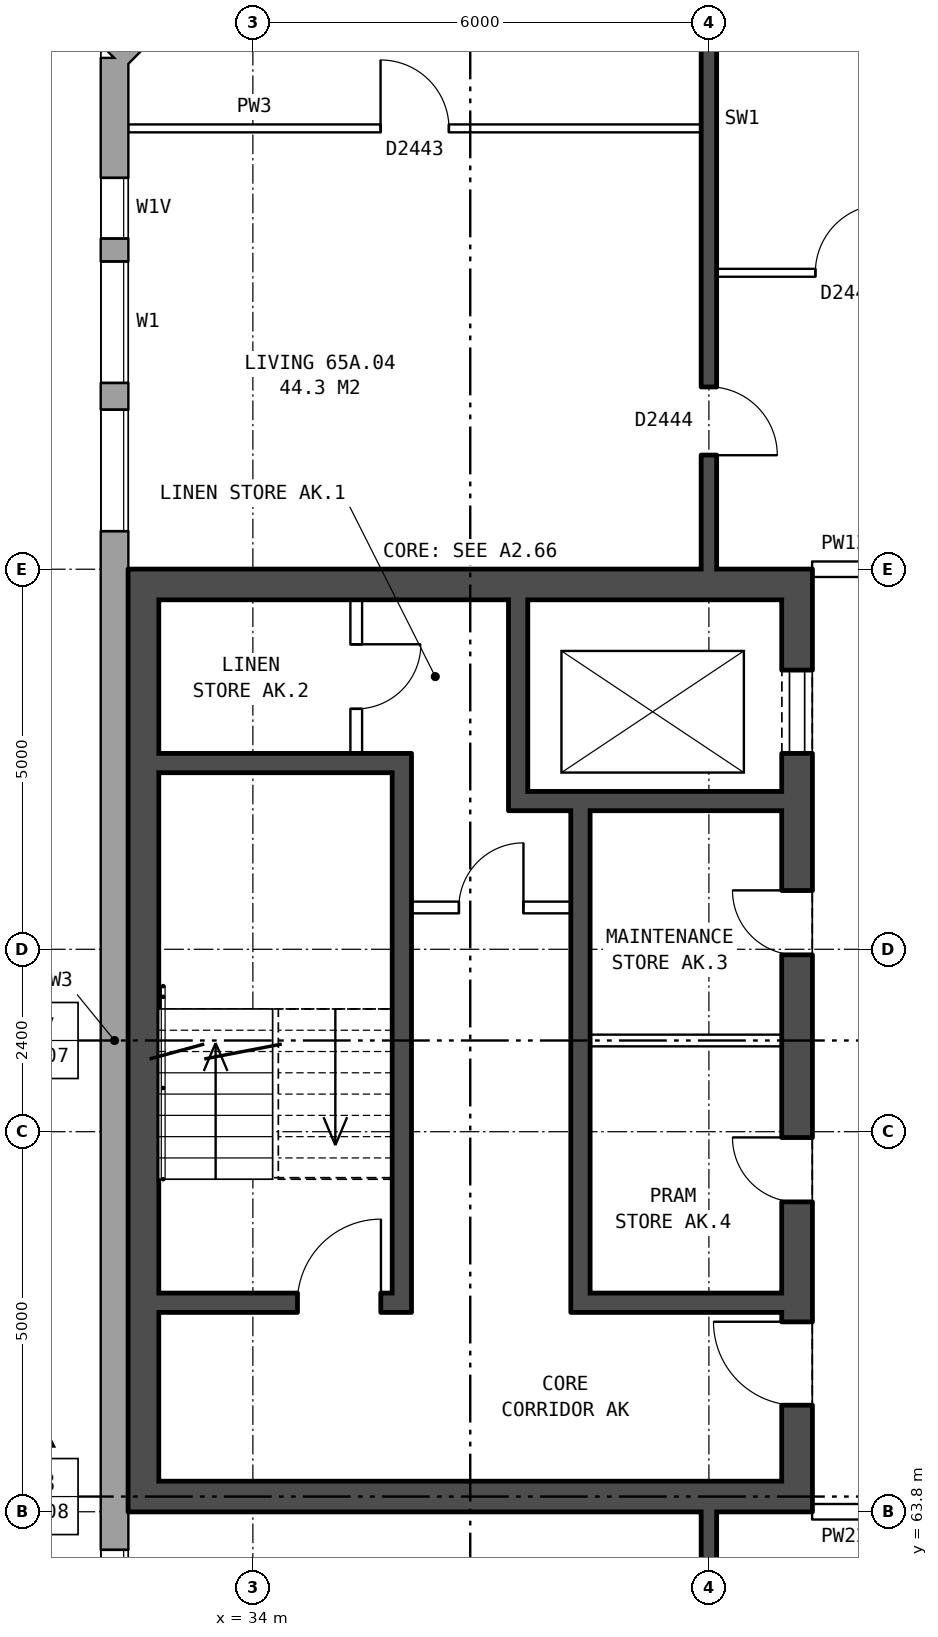
"""IFC4 building model, lengths in metres.
Left out: names, types, materials, properties, quantities, classifications, styles, units other than length and angle.
Written with IfcOpenShell. Run it as: python <this file> out.ifc"""

import sys

from ifc_helpers import new_model, si_unit, direction, frame, frame_2d, origin, place, context, subcontext, project, spatial, rectangle, extrude, element, fill, save


model = new_model("IFC4")
c1 = context("Model", 3, precision=1e-05, world=origin(), true_north=direction((0.0, 1.0)))
c2 = subcontext(c1, "Body", "Model", "MODEL_VIEW")
j1 = project(units=[si_unit("LENGTHUNIT", "METRE"), si_unit("PLANEANGLEUNIT", "RADIAN")], contexts=[c1])
p1 = place(None, origin())
s1 = spatial("IfcSite", under=j1, at=p1, CompositionType="ELEMENT")
p2 = place(p1, origin())
s2 = spatial("IfcBuilding", under=s1, at=p2, CompositionType="ELEMENT")
p3 = place(p2, frame((0.0, 0.0, 230.7)))
s3 = spatial("IfcBuildingStorey", under=s2, at=p3, CompositionType="ELEMENT", Elevation=230.7)
p4 = place(p3, frame((35.075, 85.82, 0.0), z_axis=(0.0, 0.0, 1.0), x_axis=(-0.707106781187, -0.707106781187, 0.0)))
e1 = element("IfcWall", 1, at=p4, inside=s3, PredefinedType="STANDARD", context=c2, shape_type="SweptSolid", body=[
    extrude(rectangle(XDim=4.094, YDim=0.36, at=frame_2d((2.047, 0.0))), origin(), (0.0, 0.0, 1.0), 2.85),
])
p5 = place(p4, frame((1.247, 0.0, 0.8)))
e2 = element("IfcOpeningElement", 2, at=p5, cuts=e1, PredefinedType="OPENING", context=c2, shape_type="SweptSolid", body=[
    extrude(rectangle(XDim=1.6, YDim=1.8, at=frame_2d((0.8, 0.9))), frame((0.0, 0.19, 0.0), z_axis=(0.0, -1.0, 0.0), x_axis=(1.0, 0.0, 0.0)), (0.0, 0.0, 1.0), 0.38),
])
p6 = place(p3, frame((32.18, 82.925, 0.0), z_axis=(0.0, 0.0, 1.0), x_axis=(0.0, -1.0, 0.0)))
e3 = element("IfcWall", 3, at=p6, inside=s3, PredefinedType="STANDARD", context=c2, shape_type="SweptSolid", body=[
    extrude(rectangle(XDim=25.851, YDim=0.36, at=frame_2d((12.925, 0.0))), origin(), (0.0, 0.0, 1.0), 2.85),
])
p7 = place(p6, frame((1.575, 0.0, 1.7)))
e4 = element("IfcOpeningElement", 4, at=p7, cuts=e3, PredefinedType="OPENING", context=c2, shape_type="SweptSolid", body=[
    extrude(rectangle(XDim=0.8, YDim=0.9, at=frame_2d((0.4, 0.45))), frame((0.0, 0.19, 0.0), z_axis=(0.0, -1.0, 0.0), x_axis=(1.0, 0.0, 0.0)), (0.0, 0.0, 1.0), 0.38),
])
p8 = place(p6, frame((4.625, 0.0, 0.8)))
e5 = element("IfcOpeningElement", 5, at=p8, cuts=e3, PredefinedType="OPENING", context=c2, shape_type="SweptSolid", body=[
    extrude(rectangle(XDim=1.6, YDim=1.8, at=frame_2d((0.8, 0.9))), frame((0.0, 0.19, 0.0), z_axis=(0.0, -1.0, 0.0), x_axis=(1.0, 0.0, 0.0)), (0.0, 0.0, 1.0), 0.38),
])
p9 = place(p6, frame((19.625, 0.0, 0.8)))
e6 = element("IfcOpeningElement", 6, at=p9, cuts=e3, PredefinedType="OPENING", context=c2, shape_type="SweptSolid", body=[
    extrude(rectangle(XDim=1.6, YDim=1.8, at=frame_2d((0.8, 0.9))), frame((0.0, 0.19, 0.0), z_axis=(0.0, -1.0, 0.0), x_axis=(1.0, 0.0, 0.0)), (0.0, 0.0, 1.0), 0.38),
])
p10 = place(p6, frame((21.525, 0.0, 0.8)))
e7 = element("IfcOpeningElement", 7, at=p10, cuts=e3, PredefinedType="OPENING", context=c2, shape_type="SweptSolid", body=[
    extrude(rectangle(XDim=1.6, YDim=1.8, at=frame_2d((0.8, 0.9))), frame((0.0, 0.19, 0.0), z_axis=(0.0, -1.0, 0.0), x_axis=(1.0, 0.0, 0.0)), (0.0, 0.0, 1.0), 0.38),
])
p11 = place(p6, frame((2.675, 0.0, 0.8)))
e8 = element("IfcOpeningElement", 8, at=p11, cuts=e3, PredefinedType="OPENING", context=c2, shape_type="SweptSolid", body=[
    extrude(rectangle(XDim=1.6, YDim=1.8, at=frame_2d((0.8, 0.9))), frame((0.0, 0.19, 0.0), z_axis=(0.0, -1.0, 0.0), x_axis=(1.0, 0.0, 0.0)), (0.0, 0.0, 1.0), 0.38),
])
p12 = place(p6, frame((23.425, 0.0, 1.7)))
e9 = element("IfcOpeningElement", 9, at=p12, cuts=e3, PredefinedType="OPENING", context=c2, shape_type="SweptSolid", body=[
    extrude(rectangle(XDim=0.8, YDim=0.9, at=frame_2d((0.4, 0.45))), frame((0.0, 0.19, 0.0), z_axis=(0.0, -1.0, 0.0), x_axis=(1.0, 0.0, 0.0)), (0.0, 0.0, 1.0), 0.38),
])
p13 = place(p3, frame((41.16, 76.2, 0.0), z_axis=(0.0, 0.0, 1.0), x_axis=(0.0, -1.0, 0.0)))
e10 = element("IfcWall", 10, at=p13, inside=s3, PredefinedType="SHEAR", context=c2, shape_type="SweptSolid", body=[
    extrude(rectangle(XDim=12.4, YDim=0.4, at=frame_2d((6.2, 0.0))), origin(), (0.0, 0.0, 1.0), 2.85),
])
p14 = place(p13, frame((1.325, 0.0, 0.0)))
e11 = element("IfcOpeningElement", 11, at=p14, cuts=e10, PredefinedType="OPENING", context=c2, shape_type="SweptSolid", body=[
    extrude(rectangle(XDim=1.1, YDim=2.1, at=frame_2d((0.55, 1.05))), frame((0.0, 0.21, 0.0), z_axis=(0.0, -1.0, 0.0), x_axis=(1.0, 0.0, 0.0)), (0.0, 0.0, 1.0), 0.42),
])
p15 = place(p13, frame((4.225, 0.0, 0.0)))
e12 = element("IfcOpeningElement", 12, at=p15, cuts=e10, PredefinedType="OPENING", context=c2, shape_type="SweptSolid", body=[
    extrude(rectangle(XDim=0.85, YDim=2.1, at=frame_2d((0.425, 1.05))), frame((0.0, 0.21, 0.0), z_axis=(0.0, -1.0, 0.0), x_axis=(1.0, 0.0, 0.0)), (0.0, 0.0, 1.0), 0.42),
])
p16 = place(p13, frame((7.475, 0.0, 0.0)))
e13 = element("IfcOpeningElement", 13, at=p16, cuts=e10, PredefinedType="OPENING", context=c2, shape_type="SweptSolid", body=[
    extrude(rectangle(XDim=0.85, YDim=2.1, at=frame_2d((0.425, 1.05))), frame((0.0, 0.21, 0.0), z_axis=(0.0, -1.0, 0.0), x_axis=(1.0, 0.0, 0.0)), (0.0, 0.0, 1.0), 0.42),
])
p17 = place(p13, frame((9.9, 0.0, 0.0)))
e14 = element("IfcOpeningElement", 14, at=p17, cuts=e10, PredefinedType="OPENING", context=c2, shape_type="SweptSolid", body=[
    extrude(rectangle(XDim=1.1, YDim=2.1, at=frame_2d((0.55, 1.05))), frame((0.0, 0.21, 0.0), z_axis=(0.0, -1.0, 0.0), x_axis=(1.0, 0.0, 0.0)), (0.0, 0.0, 1.0), 0.42),
])
p18 = place(p3, frame((32.56, 76.2, 0.0), z_axis=(0.0, 0.0, 1.0), x_axis=(0.0, -1.0, 0.0)))
e15 = element("IfcWall", 15, at=p18, inside=s3, PredefinedType="SHEAR", context=c2, shape_type="SweptSolid", body=[
    extrude(rectangle(XDim=12.4, YDim=0.4, at=frame_2d((6.2, 0.0))), origin(), (0.0, 0.0, 1.0), 2.85),
])
for number, where, z_axis, x_axis in (
    (16, (40.96, 76.0, 0.0), (0.0, 0.0, 1.0), (-1.0, 0.0, 0.0)),
    (17, (40.96, 64.0, 0.0), (0.0, 0.0, 1.0), (-1.0, 0.0, 0.0)),
):
    element("IfcWall", number, at=place(p3, frame(where, z_axis=z_axis, x_axis=x_axis)), inside=s3, PredefinedType="SHEAR", context=c2, shape_type="SweptSolid", body=[
        extrude(rectangle(XDim=8.2, YDim=0.4, at=frame_2d((4.1, 0.0))), origin(), (0.0, 0.0, 1.0), 2.85),
    ])
p19 = place(p3, frame((35.835, 73.65, 0.0), z_axis=(0.0, 0.0, 1.0), x_axis=(-1.0, 0.0, 0.0)))
e18 = element("IfcWall", 18, at=p19, inside=s3, PredefinedType="SHEAR", context=c2, shape_type="SweptSolid", body=[
    extrude(rectangle(XDim=3.075, YDim=0.25, at=frame_2d((1.538, 0.0))), origin(), (0.0, 0.0, 1.0), 2.85),
])
p20 = place(p3, frame((40.96, 73.15, 0.0), z_axis=(0.0, 0.0, 1.0), x_axis=(-1.0, 0.0, 0.0)))
e19 = element("IfcWall", 19, at=p20, inside=s3, PredefinedType="SHEAR", context=c2, shape_type="SweptSolid", body=[
    extrude(rectangle(XDim=3.595, YDim=0.25, at=frame_2d((1.797, 0.0))), origin(), (0.0, 0.0, 1.0), 2.85),
])
p21 = place(p3, frame((38.185, 71.75, 0.0), z_axis=(0.0, 0.0, 1.0), x_axis=(-1.0, 0.0, 0.0)))
e20 = element("IfcWall", 20, at=p21, inside=s3, PredefinedType="PARTITIONING", context=c2, shape_type="SweptSolid", body=[
    extrude(rectangle(XDim=2.1, YDim=0.15, at=frame_2d((1.05, 0.0))), origin(), (0.0, 0.0, 1.0), 2.85),
])
p22 = place(p21, frame((0.625, 0.0, 0.0)))
e21 = element("IfcOpeningElement", 21, at=p22, cuts=e20, PredefinedType="OPENING", context=c2, shape_type="SweptSolid", body=[
    extrude(rectangle(XDim=0.85, YDim=2.1, at=frame_2d((0.425, 1.05))), frame((0.0, 0.085, 0.0), z_axis=(0.0, -1.0, 0.0), x_axis=(1.0, 0.0, 0.0)), (0.0, 0.0, 1.0), 0.17),
])
p23 = place(p3, frame((40.96, 70.0, 0.0), z_axis=(0.0, 0.0, 1.0), x_axis=(-1.0, 0.0, 0.0)))
e22 = element("IfcWall", 22, at=p23, inside=s3, PredefinedType="PARTITIONING", context=c2, shape_type="SweptSolid", body=[
    extrude(rectangle(XDim=2.525, YDim=0.15, at=frame_2d((1.262, 0.0))), origin(), (0.0, 0.0, 1.0), 2.85),
])
p24 = place(p3, frame((40.96, 66.55, 0.0), z_axis=(0.0, 0.0, 1.0), x_axis=(-1.0, 0.0, 0.0)))
e23 = element("IfcWall", 23, at=p24, inside=s3, PredefinedType="SHEAR", context=c2, shape_type="SweptSolid", body=[
    extrude(rectangle(XDim=2.525, YDim=0.25, at=frame_2d((1.262, 0.0))), origin(), (0.0, 0.0, 1.0), 2.85),
])
p25 = place(p3, frame((35.835, 66.55, 0.0), z_axis=(0.0, 0.0, 1.0), x_axis=(-1.0, 0.0, 0.0)))
e24 = element("IfcWall", 24, at=p25, inside=s3, PredefinedType="SHEAR", context=c2, shape_type="SweptSolid", body=[
    extrude(rectangle(XDim=3.075, YDim=0.25, at=frame_2d((1.538, 0.0))), origin(), (0.0, 0.0, 1.0), 2.85),
])
p26 = place(p25, frame((0.15, 0.0, 0.0)))
e25 = element("IfcOpeningElement", 25, at=p26, cuts=e24, PredefinedType="OPENING", context=c2, shape_type="SweptSolid", body=[
    extrude(rectangle(XDim=1.1, YDim=2.1, at=frame_2d((0.55, 1.05))), frame((0.0, 0.135, 0.0), z_axis=(0.0, -1.0, 0.0), x_axis=(1.0, 0.0, 0.0)), (0.0, 0.0, 1.0), 0.27),
])
p27 = place(p3, frame((38.31, 73.025, 0.0), z_axis=(0.0, 0.0, 1.0), x_axis=(0.0, -1.0, 0.0)))
e26 = element("IfcWall", 26, at=p27, inside=s3, PredefinedType="SHEAR", context=c2, shape_type="SweptSolid", body=[
    extrude(rectangle(XDim=6.6, YDim=0.25, at=frame_2d((3.3, 0.0))), origin(), (0.0, 0.0, 1.0), 2.85),
])
p28 = place(p3, frame((37.49, 75.8, 0.0), z_axis=(0.0, 0.0, 1.0), x_axis=(0.0, -1.0, 0.0)))
e27 = element("IfcWall", 27, at=p28, inside=s3, PredefinedType="SHEAR", context=c2, shape_type="SweptSolid", body=[
    extrude(rectangle(XDim=2.525, YDim=0.25, at=frame_2d((1.263, 0.0))), origin(), (0.0, 0.0, 1.0), 2.85),
])
p29 = place(p3, frame((35.96, 73.775, 0.0), z_axis=(0.0, 0.0, 1.0), x_axis=(0.0, -1.0, 0.0)))
e28 = element("IfcWall", 28, at=p29, inside=s3, PredefinedType="SHEAR", context=c2, shape_type="SweptSolid", body=[
    extrude(rectangle(XDim=7.35, YDim=0.25, at=frame_2d((3.675, 0.0))), origin(), (0.0, 0.0, 1.0), 2.85),
])
p30 = place(p3, frame((35.36, 75.8, 0.0), z_axis=(0.0, 0.0, 1.0), x_axis=(0.0, -1.0, 0.0)))
e29 = element("IfcWall", 29, at=p30, inside=s3, PredefinedType="PARTITIONING", context=c2, shape_type="SweptSolid", body=[
    extrude(rectangle(XDim=2.025, YDim=0.15, at=frame_2d((1.013, 0.0))), origin(), (0.0, 0.0, 1.0), 2.85),
])
p31 = place(p30, frame((0.587, 0.0, 0.0)))
e30 = element("IfcOpeningElement", 30, at=p31, cuts=e29, PredefinedType="OPENING", context=c2, shape_type="SweptSolid", body=[
    extrude(rectangle(XDim=0.85, YDim=2.1, at=frame_2d((0.425, 1.05))), frame((0.0, 0.085, 0.0), z_axis=(0.0, -1.0, 0.0), x_axis=(1.0, 0.0, 0.0)), (0.0, 0.0, 1.0), 0.17),
])
p32 = place(p3, frame((41.36, 63.8, 0.0), z_axis=(0.0, 0.0, 1.0), x_axis=(1.0, 0.0, 0.0)))
e31 = element("IfcWall", 31, at=p32, inside=s3, PredefinedType="PARTITIONING", context=c2, shape_type="SweptSolid", body=[
    extrude(rectangle(XDim=3.0, YDim=0.2, at=frame_2d((1.5, 0.0))), origin(), (0.0, 0.0, 1.0), 2.85),
])
p33 = place(p32, frame((1.0, 0.0, 0.0)))
e32 = element("IfcOpeningElement", 32, at=p33, cuts=e31, PredefinedType="OPENING", context=c2, shape_type="SweptSolid", body=[
    extrude(rectangle(XDim=1.0, YDim=2.1, at=frame_2d((0.5, 1.05))), frame((0.0, 0.11, 0.0), z_axis=(0.0, -1.0, 0.0), x_axis=(1.0, 0.0, 0.0)), (0.0, 0.0, 1.0), 0.22),
])
p34 = place(p3, frame((41.36, 76.2, 0.0), z_axis=(0.0, 0.0, 1.0), x_axis=(1.0, 0.0, 0.0)))
e33 = element("IfcWall", 33, at=p34, inside=s3, PredefinedType="PARTITIONING", context=c2, shape_type="SweptSolid", body=[
    extrude(rectangle(XDim=3.0, YDim=0.2, at=frame_2d((1.5, 0.0))), origin(), (0.0, 0.0, 1.0), 2.85),
])
p35 = place(p34, frame((1.0, 0.0, 0.0)))
e34 = element("IfcOpeningElement", 34, at=p35, cuts=e33, PredefinedType="OPENING", context=c2, shape_type="SweptSolid", body=[
    extrude(rectangle(XDim=1.0, YDim=2.1, at=frame_2d((0.5, 1.05))), frame((0.0, 0.11, 0.0), z_axis=(0.0, -1.0, 0.0), x_axis=(1.0, 0.0, 0.0)), (0.0, 0.0, 1.0), 0.22),
])
p36 = place(p3, frame((40.1, 80.1, 0.0), z_axis=(0.0, 0.0, 1.0), x_axis=(1.0, 0.0, 0.0)))
e35 = element("IfcWall", 35, at=p36, inside=s3, PredefinedType="PARTITIONING", context=c2, shape_type="SweptSolid", body=[
    extrude(rectangle(XDim=5.8, YDim=0.1, at=frame_2d((2.9, 0.0))), origin(), (0.0, 0.0, 1.0), 2.85),
])
p37 = place(p36, frame((1.3, 0.0, 0.0)))
e36 = element("IfcOpeningElement", 36, at=p37, cuts=e35, PredefinedType="OPENING", context=c2, shape_type="SweptSolid", body=[
    extrude(rectangle(XDim=0.9, YDim=2.1, at=frame_2d((0.45, 1.05))), frame((0.0, 0.06, 0.0), z_axis=(0.0, -1.0, 0.0), x_axis=(1.0, 0.0, 0.0)), (0.0, 0.0, 1.0), 0.12),
])
p38 = place(p36, frame((4.2, 0.0, 0.0)))
e37 = element("IfcOpeningElement", 37, at=p38, cuts=e35, PredefinedType="OPENING", context=c2, shape_type="SweptSolid", body=[
    extrude(rectangle(XDim=0.9, YDim=2.1, at=frame_2d((0.45, 1.05))), frame((0.0, 0.06, 0.0), z_axis=(0.0, -1.0, 0.0), x_axis=(1.0, 0.0, 0.0)), (0.0, 0.0, 1.0), 0.12),
])
p39 = place(p3, frame((32.36, 82.0, 0.0), z_axis=(0.0, 0.0, 1.0), x_axis=(1.0, 0.0, 0.0)))
e38 = element("IfcWall", 38, at=p39, inside=s3, PredefinedType="PARTITIONING", context=c2, shape_type="SweptSolid", body=[
    extrude(rectangle(XDim=7.54, YDim=0.1, at=frame_2d((3.77, 0.0))), origin(), (0.0, 0.0, 1.0), 2.85),
])
p40 = place(p39, frame((3.32, 0.0, 0.0)))
e39 = element("IfcOpeningElement", 39, at=p40, cuts=e38, PredefinedType="OPENING", context=c2, shape_type="SweptSolid", body=[
    extrude(rectangle(XDim=0.9, YDim=2.1, at=frame_2d((0.45, 1.05))), frame((0.0, 0.06, 0.0), z_axis=(0.0, -1.0, 0.0), x_axis=(1.0, 0.0, 0.0)), (0.0, 0.0, 1.0), 0.12),
])
p41 = place(p3, frame((40.0, 54.36, 0.0), z_axis=(0.0, 0.0, 1.0), x_axis=(0.0, 1.0, 0.0)))
e40 = element("IfcWall", 40, at=p41, inside=s3, PredefinedType="SOLIDWALL", context=c2, shape_type="SweptSolid", body=[
    extrude(rectangle(XDim=9.44, YDim=0.2, at=frame_2d((4.72, 0.0))), origin(), (0.0, 0.0, 1.0), 2.85),
])
p42 = place(p41, frame((7.19, 0.0, 0.0)))
e41 = element("IfcOpeningElement", 41, at=p42, cuts=e40, PredefinedType="OPENING", context=c2, shape_type="SweptSolid", body=[
    extrude(rectangle(XDim=0.9, YDim=2.1, at=frame_2d((0.45, 1.05))), frame((0.0, 0.11, 0.0), z_axis=(0.0, -1.0, 0.0), x_axis=(1.0, 0.0, 0.0)), (0.0, 0.0, 1.0), 0.22),
])
p43 = place(p3, frame((40.0, 76.2, 0.0), z_axis=(0.0, 0.0, 1.0), x_axis=(0.0, 1.0, 0.0)))
e42 = element("IfcWall", 42, at=p43, inside=s3, PredefinedType="SOLIDWALL", context=c2, shape_type="SweptSolid", body=[
    extrude(rectangle(XDim=9.44, YDim=0.2, at=frame_2d((4.72, 0.0))), origin(), (0.0, 0.0, 1.0), 2.85),
])
p44 = place(p43, frame((1.5, 0.0, 0.0)))
e43 = element("IfcOpeningElement", 43, at=p44, cuts=e42, PredefinedType="OPENING", context=c2, shape_type="SweptSolid", body=[
    extrude(rectangle(XDim=0.9, YDim=2.1, at=frame_2d((0.45, 1.05))), frame((0.0, 0.11, 0.0), z_axis=(0.0, -1.0, 0.0), x_axis=(1.0, 0.0, 0.0)), (0.0, 0.0, 1.0), 0.22),
])
p45 = place(p7, origin())
e44 = element("IfcWindow", 44, at=p45, inside=s3, PartitioningType="SINGLE_PANEL", PredefinedType="WINDOW", context=c2, shape_type="SweptSolid", body=[
    extrude(rectangle(XDim=0.8, YDim=0.9, at=frame_2d((0.4, 0.45))), frame((0.0, 0.15, 0.0), z_axis=(0.0, -1.0, 0.0), x_axis=(1.0, 0.0, 0.0)), (0.0, 0.0, 1.0), 0.06),
])
fill(e4, e44)
p46 = place(p8, origin())
e45 = element("IfcWindow", 45, at=p46, inside=s3, PartitioningType="SINGLE_PANEL", PredefinedType="WINDOW", context=c2, shape_type="SweptSolid", body=[
    extrude(rectangle(XDim=1.6, YDim=1.8, at=frame_2d((0.8, 0.9))), frame((0.0, 0.15, 0.0), z_axis=(0.0, -1.0, 0.0), x_axis=(1.0, 0.0, 0.0)), (0.0, 0.0, 1.0), 0.06),
])
fill(e5, e45)
p47 = place(p9, origin())
e46 = element("IfcWindow", 46, at=p47, inside=s3, PartitioningType="SINGLE_PANEL", PredefinedType="WINDOW", context=c2, shape_type="SweptSolid", body=[
    extrude(rectangle(XDim=1.6, YDim=1.8, at=frame_2d((0.8, 0.9))), frame((0.0, 0.15, 0.0), z_axis=(0.0, -1.0, 0.0), x_axis=(1.0, 0.0, 0.0)), (0.0, 0.0, 1.0), 0.06),
])
fill(e6, e46)
p48 = place(p14, origin())
e47 = element("IfcDoor", 47, at=p48, inside=s3, OperationType="DOUBLE_DOOR_SLIDING", PredefinedType="DOOR", context=c2, shape_type="SweptSolid", body=[
    extrude(rectangle(XDim=1.1, YDim=2.1, at=frame_2d((0.55, 1.05))), frame((0.0, -0.135, 0.0), z_axis=(0.0, -1.0, 0.0), x_axis=(1.0, 0.0, 0.0)), (0.0, 0.0, 1.0), 0.05),
])
fill(e11, e47)
p49 = place(p15, frame((0.85, 0.0, 0.0), z_axis=(0.0, 0.0, 1.0), x_axis=(-1.0, 0.0, 0.0)))
e48 = element("IfcDoor", 48, at=p49, inside=s3, OperationType="SINGLE_SWING_RIGHT", PredefinedType="DOOR", context=c2, shape_type="SweptSolid", body=[
    extrude(rectangle(XDim=0.85, YDim=2.1, at=frame_2d((0.425, 1.05))), frame((0.0, 0.185, 0.0), z_axis=(0.0, -1.0, 0.0), x_axis=(1.0, 0.0, 0.0)), (0.0, 0.0, 1.0), 0.05),
])
fill(e12, e48)
p50 = place(p16, frame((0.85, 0.0, 0.0), z_axis=(0.0, 0.0, 1.0), x_axis=(-1.0, 0.0, 0.0)))
e49 = element("IfcDoor", 49, at=p50, inside=s3, OperationType="SINGLE_SWING_RIGHT", PredefinedType="DOOR", context=c2, shape_type="SweptSolid", body=[
    extrude(rectangle(XDim=0.85, YDim=2.1, at=frame_2d((0.425, 1.05))), frame((0.0, 0.185, 0.0), z_axis=(0.0, -1.0, 0.0), x_axis=(1.0, 0.0, 0.0)), (0.0, 0.0, 1.0), 0.05),
])
fill(e13, e49)
p51 = place(p17, frame((1.1, 0.0, 0.0), z_axis=(0.0, 0.0, 1.0), x_axis=(-1.0, 0.0, 0.0)))
e50 = element("IfcDoor", 50, at=p51, inside=s3, OperationType="SINGLE_SWING_RIGHT", PredefinedType="DOOR", context=c2, shape_type="SweptSolid", body=[
    extrude(rectangle(XDim=1.1, YDim=2.1, at=frame_2d((0.55, 1.05))), frame((0.0, 0.185, 0.0), z_axis=(0.0, -1.0, 0.0), x_axis=(1.0, 0.0, 0.0)), (0.0, 0.0, 1.0), 0.05),
])
fill(e14, e50)
p52 = place(p26, frame((1.1, 0.0, 0.0), z_axis=(0.0, 0.0, 1.0), x_axis=(-1.0, 0.0, 0.0)))
e51 = element("IfcDoor", 51, at=p52, inside=s3, OperationType="SINGLE_SWING_RIGHT", PredefinedType="DOOR", context=c2, shape_type="SweptSolid", body=[
    extrude(rectangle(XDim=1.1, YDim=2.1, at=frame_2d((0.55, 1.05))), frame((0.0, 0.025, 0.0), z_axis=(0.0, -1.0, 0.0), x_axis=(1.0, 0.0, 0.0)), (0.0, 0.0, 1.0), 0.05),
])
fill(e25, e51)
p53 = place(p22, frame((0.85, 0.0, 0.0), z_axis=(0.0, 0.0, 1.0), x_axis=(-1.0, 0.0, 0.0)))
e52 = element("IfcDoor", 52, at=p53, inside=s3, OperationType="SINGLE_SWING_RIGHT", PredefinedType="DOOR", context=c2, shape_type="SweptSolid", body=[
    extrude(rectangle(XDim=0.85, YDim=2.1, at=frame_2d((0.425, 1.05))), frame((0.0, 0.025, 0.0), z_axis=(0.0, -1.0, 0.0), x_axis=(1.0, 0.0, 0.0)), (0.0, 0.0, 1.0), 0.05),
])
fill(e21, e52)
p54 = place(p31, origin())
e53 = element("IfcDoor", 53, at=p54, inside=s3, OperationType="SINGLE_SWING_LEFT", PredefinedType="DOOR", context=c2, shape_type="SweptSolid", body=[
    extrude(rectangle(XDim=0.85, YDim=2.1, at=frame_2d((0.425, 1.05))), frame((0.0, 0.025, 0.0), z_axis=(0.0, -1.0, 0.0), x_axis=(1.0, 0.0, 0.0)), (0.0, 0.0, 1.0), 0.05),
])
fill(e30, e53)
p55 = place(p37, origin())
e54 = element("IfcDoor", 54, at=p55, inside=s3, OperationType="SINGLE_SWING_RIGHT", PredefinedType="DOOR", context=c2, shape_type="SweptSolid", body=[
    extrude(rectangle(XDim=0.9, YDim=2.1, at=frame_2d((0.45, 1.05))), frame((0.0, 0.025, 0.0), z_axis=(0.0, -1.0, 0.0), x_axis=(1.0, 0.0, 0.0)), (0.0, 0.0, 1.0), 0.05),
])
fill(e36, e54)
p56 = place(p40, origin())
e55 = element("IfcDoor", 55, at=p56, inside=s3, OperationType="SINGLE_SWING_LEFT", PredefinedType="DOOR", context=c2, shape_type="SweptSolid", body=[
    extrude(rectangle(XDim=0.9, YDim=2.1, at=frame_2d((0.45, 1.05))), frame((0.0, 0.025, 0.0), z_axis=(0.0, -1.0, 0.0), x_axis=(1.0, 0.0, 0.0)), (0.0, 0.0, 1.0), 0.05),
])
fill(e39, e55)
p57 = place(p44, frame((0.9, 0.0, 0.0), z_axis=(0.0, 0.0, 1.0), x_axis=(-1.0, 0.0, 0.0)))
e56 = element("IfcDoor", 56, at=p57, inside=s3, OperationType="SINGLE_SWING_RIGHT", PredefinedType="DOOR", context=c2, shape_type="SweptSolid", body=[
    extrude(rectangle(XDim=0.9, YDim=2.1, at=frame_2d((0.45, 1.05))), frame((0.0, 0.025, 0.0), z_axis=(0.0, -1.0, 0.0), x_axis=(1.0, 0.0, 0.0)), (0.0, 0.0, 1.0), 0.05),
])
fill(e43, e56)
p58 = place(p11, origin())
e57 = element("IfcWindow", 57, at=p58, inside=s3, PartitioningType="SINGLE_PANEL", PredefinedType="WINDOW", context=c2, shape_type="SweptSolid", body=[
    extrude(rectangle(XDim=1.6, YDim=1.8, at=frame_2d((0.8, 0.9))), frame((0.0, 0.15, 0.0), z_axis=(0.0, -1.0, 0.0), x_axis=(1.0, 0.0, 0.0)), (0.0, 0.0, 1.0), 0.06),
])
fill(e8, e57)
save(model, sys.argv[1])
